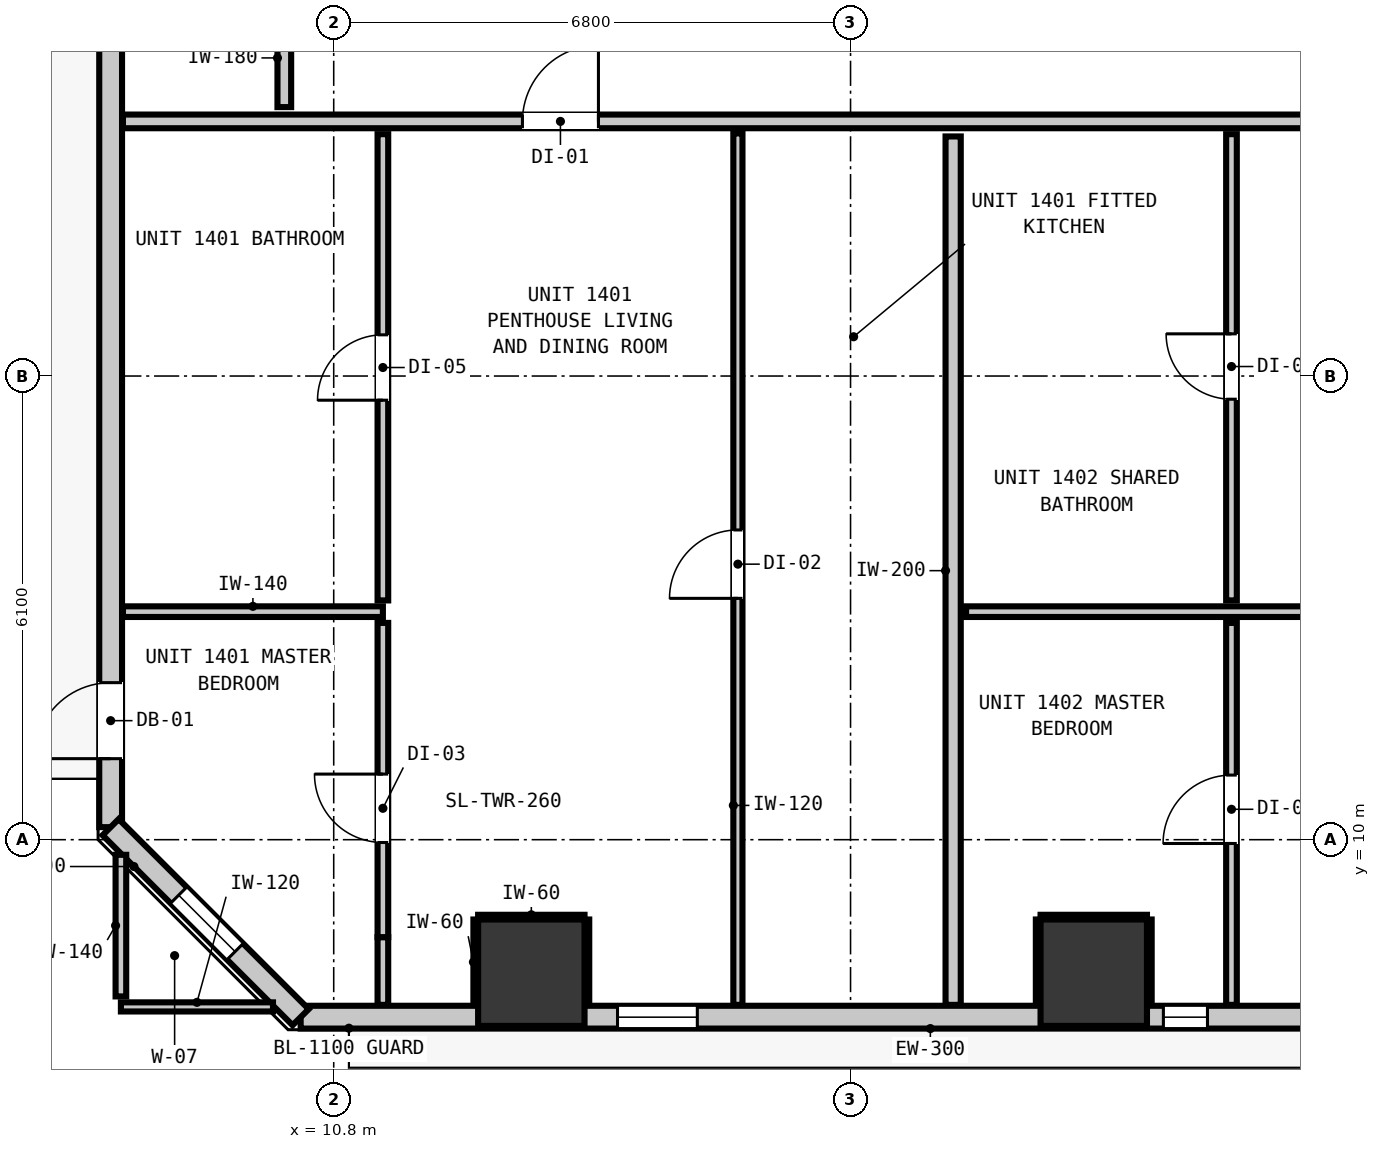
"""IFC4 building model, lengths in metres.
Left out: names, types, materials, properties, quantities, classifications, styles, units other than length and angle.
Written with IfcOpenShell. Run it as: python <this file> out.ifc"""

import sys

from ifc_helpers import new_model, si_unit, direction, frame, frame_2d, origin, origin_2d, place, context, subcontext, project, spatial, rectangle, extrude, element, fill, save


model = new_model("IFC4")
c1 = context("Model", 3, precision=1e-05, world=origin(), true_north=direction((0.0, 1.0)))
c2 = subcontext(c1, "Body", "Model", "MODEL_VIEW")
j1 = project(units=[si_unit("LENGTHUNIT", "METRE"), si_unit("PLANEANGLEUNIT", "RADIAN")], contexts=[c1])
p1 = place(None, origin())
s1 = spatial("IfcSite", under=j1, at=p1, CompositionType="ELEMENT")
p2 = place(p1, origin())
s2 = spatial("IfcBuilding", under=s1, at=p2, CompositionType="ELEMENT")
p3 = place(p2, frame((0.0, 0.0, 51.88)))
s3 = spatial("IfcBuildingStorey", under=s2, at=p3, CompositionType="ELEMENT", Elevation=51.88)
for number, where, z_axis, x_axis in (
    (1, (13.4, 8.25, 0.0), (0.0, 0.0, 1.0), (1.0, 0.0, 0.0)),
    (2, (20.8, 8.25, 0.0), (0.0, 0.0, 1.0), (1.0, 0.0, 0.0)),
):
    element("IfcColumn", number, at=place(p3, frame(where, z_axis=z_axis, x_axis=x_axis)), inside=s3, PredefinedType="COLUMN", context=c2, shape_type="SweptSolid", body=[
        extrude(rectangle(XDim=1.4, YDim=1.4, at=origin_2d()), origin(), (0.0, 0.0, 1.0), 3.32),
    ])
p4 = place(p3, frame((7.865, 10.165, 0.0), z_axis=(0.0, 0.0, 1.0), x_axis=(0.0, 1.0, 0.0)))
e3 = element("IfcWall", 3, at=p4, inside=s3, PredefinedType="STANDARD", context=c2, shape_type="SweptSolid", body=[
    extrude(rectangle(XDim=34.67, YDim=0.3, at=frame_2d((17.335, 0.0))), origin(), (0.0, 0.0, 1.0), 3.06),
])
p5 = place(p4, frame((0.901, 0.0, 0.0)))
e4 = element("IfcOpeningElement", 4, at=p5, cuts=e3, PredefinedType="OPENING", context=c2, shape_type="SweptSolid", body=[
    extrude(rectangle(XDim=1.0, YDim=2.15, at=frame_2d((0.5, 1.075))), frame((0.0, 0.16, 0.0), z_axis=(0.0, -1.0, 0.0), x_axis=(1.0, 0.0, 0.0)), (0.0, 0.0, 1.0), 0.32),
])
p6 = place(p3, frame((47.835, 7.665, 0.0), z_axis=(0.0, 0.0, 1.0), x_axis=(-1.0, 0.0, 0.0)))
e5 = element("IfcWall", 5, at=p6, inside=s3, PredefinedType="STANDARD", context=c2, shape_type="SweptSolid", body=[
    extrude(rectangle(XDim=37.47, YDim=0.3, at=frame_2d((18.735, 0.0))), origin(), (0.0, 0.0, 1.0), 3.06),
])
p7 = place(p6, frame((2.301, 0.0, 0.0)))
e6 = element("IfcOpeningElement", 6, at=p7, cuts=e5, PredefinedType="OPENING", context=c2, shape_type="SweptSolid", body=[
    extrude(rectangle(XDim=1.0, YDim=2.15, at=frame_2d((0.5, 1.075))), frame((0.0, 0.16, 0.0), z_axis=(0.0, -1.0, 0.0), x_axis=(1.0, 0.0, 0.0)), (0.0, 0.0, 1.0), 0.32),
])
p8 = place(p6, frame((32.251, 0.0, 0.85)))
e7 = element("IfcOpeningElement", 7, at=p8, cuts=e5, PredefinedType="OPENING", context=c2, shape_type="SweptSolid", body=[
    extrude(rectangle(XDim=1.05, YDim=1.65, at=frame_2d((0.525, 0.825))), frame((0.0, 0.16, 0.0), z_axis=(0.0, -1.0, 0.0), x_axis=(1.0, 0.0, 0.0)), (0.0, 0.0, 1.0), 0.32),
])
p9 = place(p6, frame((21.179, 0.0, 0.85)))
e8 = element("IfcOpeningElement", 8, at=p9, cuts=e5, PredefinedType="OPENING", context=c2, shape_type="SweptSolid", body=[
    extrude(rectangle(XDim=2.1, YDim=1.9, at=frame_2d((1.05, 0.95))), frame((0.0, 0.16, 0.0), z_axis=(0.0, -1.0, 0.0), x_axis=(1.0, 0.0, 0.0)), (0.0, 0.0, 1.0), 0.32),
])
p10 = place(p6, frame((25.539, 0.0, 0.85)))
e9 = element("IfcOpeningElement", 9, at=p10, cuts=e5, PredefinedType="OPENING", context=c2, shape_type="SweptSolid", body=[
    extrude(rectangle(XDim=0.58, YDim=1.5, at=frame_2d((0.29, 0.75))), frame((0.0, 0.16, 0.0), z_axis=(0.0, -1.0, 0.0), x_axis=(1.0, 0.0, 0.0)), (0.0, 0.0, 1.0), 0.32),
])
p11 = place(p6, frame((13.985, 0.0, 0.85)))
e10 = element("IfcOpeningElement", 10, at=p11, cuts=e5, PredefinedType="OPENING", context=c2, shape_type="SweptSolid", body=[
    extrude(rectangle(XDim=2.1, YDim=1.9, at=frame_2d((1.05, 0.95))), frame((0.0, 0.16, 0.0), z_axis=(0.0, -1.0, 0.0), x_axis=(1.0, 0.0, 0.0)), (0.0, 0.0, 1.0), 0.32),
])
p12 = place(p6, frame((5.412, 0.0, 0.85)))
e11 = element("IfcOpeningElement", 11, at=p12, cuts=e5, PredefinedType="OPENING", context=c2, shape_type="SweptSolid", body=[
    extrude(rectangle(XDim=2.1, YDim=1.9, at=frame_2d((1.05, 0.95))), frame((0.0, 0.16, 0.0), z_axis=(0.0, -1.0, 0.0), x_axis=(1.0, 0.0, 0.0)), (0.0, 0.0, 1.0), 0.32),
])
p13 = place(p6, frame((9.839, 0.0, 0.85)))
e12 = element("IfcOpeningElement", 12, at=p13, cuts=e5, PredefinedType="OPENING", context=c2, shape_type="SweptSolid", body=[
    extrude(rectangle(XDim=0.58, YDim=1.5, at=frame_2d((0.29, 0.75))), frame((0.0, 0.16, 0.0), z_axis=(0.0, -1.0, 0.0), x_axis=(1.0, 0.0, 0.0)), (0.0, 0.0, 1.0), 0.32),
])
p14 = place(p6, frame((0.364, 0.0, 0.85)))
e13 = element("IfcOpeningElement", 13, at=p14, cuts=e5, PredefinedType="OPENING", context=c2, shape_type="SweptSolid", body=[
    extrude(rectangle(XDim=1.05, YDim=1.65, at=frame_2d((0.525, 0.825))), frame((0.0, 0.16, 0.0), z_axis=(0.0, -1.0, 0.0), x_axis=(1.0, 0.0, 0.0)), (0.0, 0.0, 1.0), 0.32),
])
p15 = place(p3, frame((10.365, 7.665, 0.0), z_axis=(0.0, 0.0, 1.0), x_axis=(-0.707106781187, 0.707106781187, 0.0)))
e14 = element("IfcWall", 14, at=p15, inside=s3, PredefinedType="STANDARD", context=c2, shape_type="SweptSolid", body=[
    extrude(rectangle(XDim=3.536, YDim=0.3, at=frame_2d((1.768, 0.0))), origin(), (0.0, 0.0, 1.0), 3.06),
])
p16 = place(p15, frame((1.22, 0.0, 0.85)))
e15 = element("IfcOpeningElement", 15, at=p16, cuts=e14, PredefinedType="OPENING", context=c2, shape_type="SweptSolid", body=[
    extrude(rectangle(XDim=1.05, YDim=1.65, at=frame_2d((0.525, 0.825))), frame((0.0, 0.16, 0.0), z_axis=(0.0, -1.0, 0.0), x_axis=(1.0, 0.0, 0.0)), (0.0, 0.0, 1.0), 0.32),
])
p17 = place(p3, frame((8.027, 19.45, 0.0), z_axis=(0.0, 0.0, 1.0), x_axis=(1.0, 0.0, 0.0)))
e16 = element("IfcWall", 16, at=p17, inside=s3, PredefinedType="PARTITIONING", context=c2, shape_type="SweptSolid", body=[
    extrude(rectangle(XDim=42.146, YDim=0.18, at=frame_2d((21.073, 0.0))), origin(), (0.0, 0.0, 1.0), 3.06),
])
p18 = place(p17, frame((5.256, 0.0, 0.0)))
e17 = element("IfcOpeningElement", 17, at=p18, cuts=e16, PredefinedType="OPENING", context=c2, shape_type="SweptSolid", body=[
    extrude(rectangle(XDim=1.0, YDim=2.15, at=frame_2d((0.5, 1.075))), frame((0.0, 0.1, 0.0), z_axis=(0.0, -1.0, 0.0), x_axis=(1.0, 0.0, 0.0)), (0.0, 0.0, 1.0), 0.2),
])
p19 = place(p17, frame((18.169, 0.0, 0.0)))
e18 = element("IfcOpeningElement", 18, at=p19, cuts=e16, PredefinedType="OPENING", context=c2, shape_type="SweptSolid", body=[
    extrude(rectangle(XDim=1.0, YDim=2.15, at=frame_2d((0.5, 1.075))), frame((0.0, 0.1, 0.0), z_axis=(0.0, -1.0, 0.0), x_axis=(1.0, 0.0, 0.0)), (0.0, 0.0, 1.0), 0.2),
])
p20 = place(p17, frame((33.653, 0.0, 0.0)))
e19 = element("IfcOpeningElement", 19, at=p20, cuts=e16, PredefinedType="OPENING", context=c2, shape_type="SweptSolid", body=[
    extrude(rectangle(XDim=1.0, YDim=2.15, at=frame_2d((0.5, 1.075))), frame((0.0, 0.1, 0.0), z_axis=(0.0, -1.0, 0.0), x_axis=(1.0, 0.0, 0.0)), (0.0, 0.0, 1.0), 0.2),
])
p21 = place(p3, frame((8.027, 13.0, 0.0), z_axis=(0.0, 0.0, 1.0), x_axis=(1.0, 0.0, 0.0)))
e20 = element("IfcWall", 20, at=p21, inside=s3, PredefinedType="PARTITIONING", context=c2, shape_type="SweptSolid", body=[
    extrude(rectangle(XDim=3.42, YDim=0.14, at=frame_2d((1.71, 0.0))), origin(), (0.0, 0.0, 1.0), 3.06),
])
p22 = place(p3, frame((19.12, 13.0, 0.0), z_axis=(0.0, 0.0, 1.0), x_axis=(1.0, 0.0, 0.0)))
e21 = element("IfcWall", 21, at=p22, inside=s3, PredefinedType="PARTITIONING", context=c2, shape_type="SweptSolid", body=[
    extrude(rectangle(XDim=31.053, YDim=0.14, at=frame_2d((15.526, 0.0))), origin(), (0.0, 0.0, 1.0), 3.06),
])
p23 = place(p22, frame((7.126, 0.0, 0.0)))
e22 = element("IfcOpeningElement", 22, at=p23, cuts=e21, PredefinedType="OPENING", context=c2, shape_type="SweptSolid", body=[
    extrude(rectangle(XDim=0.9, YDim=2.1, at=frame_2d((0.45, 1.05))), frame((0.0, 0.08, 0.0), z_axis=(0.0, -1.0, 0.0), x_axis=(1.0, 0.0, 0.0)), (0.0, 0.0, 1.0), 0.16),
])
p24 = place(p22, frame((22.609, 0.0, 0.0)))
e23 = element("IfcOpeningElement", 23, at=p24, cuts=e21, PredefinedType="OPENING", context=c2, shape_type="SweptSolid", body=[
    extrude(rectangle(XDim=0.9, YDim=2.1, at=frame_2d((0.45, 1.05))), frame((0.0, 0.08, 0.0), z_axis=(0.0, -1.0, 0.0), x_axis=(1.0, 0.0, 0.0)), (0.0, 0.0, 1.0), 0.16),
])
p25 = place(p3, frame((8.0, 7.8, 0.0), z_axis=(0.0, 0.0, 1.0), x_axis=(1.0, 0.0, 0.0)))
e24 = element("IfcWall", 24, at=p25, inside=s3, PredefinedType="PARTITIONING", context=c2, shape_type="SweptSolid", body=[
    extrude(rectangle(XDim=2.001, YDim=0.12, at=frame_2d((1.0, 0.0))), origin(), (0.0, 0.0, 1.0), 3.06),
])
p26 = place(p3, frame((18.95, 7.827, 0.0), z_axis=(0.0, 0.0, 1.0), x_axis=(0.0, 1.0, 0.0)))
e25 = element("IfcWall", 25, at=p26, inside=s3, PredefinedType="PARTITIONING", context=c2, shape_type="SweptSolid", body=[
    extrude(rectangle(XDim=11.425, YDim=0.2, at=frame_2d((5.712, 0.0))), origin(), (0.0, 0.0, 1.0), 3.06),
])
p27 = place(p3, frame((10.15, 19.638, 0.0), z_axis=(0.0, 0.0, 1.0), x_axis=(0.0, 1.0, 0.0)))
e26 = element("IfcWall", 26, at=p27, inside=s3, PredefinedType="PARTITIONING", context=c2, shape_type="SweptSolid", body=[
    extrude(rectangle(XDim=1.294, YDim=0.18, at=frame_2d((0.647, 0.0))), origin(), (0.0, 0.0, 1.0), 3.06),
])
p28 = place(p3, frame((8.0, 7.938, 0.0), z_axis=(0.0, 0.0, 1.0), x_axis=(0.0, 1.0, 0.0)))
e27 = element("IfcWall", 27, at=p28, inside=s3, PredefinedType="PARTITIONING", context=c2, shape_type="SweptSolid", body=[
    extrude(rectangle(XDim=1.863, YDim=0.14, at=frame_2d((0.932, 0.0))), origin(), (0.0, 0.0, 1.0), 3.06),
])
p29 = place(p3, frame((11.447, 7.827, 0.0), z_axis=(0.0, 0.0, 1.0), x_axis=(0.0, 1.0, 0.0)))
e28 = element("IfcWall", 28, at=p29, inside=s3, PredefinedType="PARTITIONING", context=c2, shape_type="SweptSolid", body=[
    extrude(rectangle(XDim=0.891, YDim=0.14, at=frame_2d((0.446, 0.0))), origin(), (0.0, 0.0, 1.0), 3.06),
])
p30 = place(p3, frame((11.447, 8.718, 0.0), z_axis=(0.0, 0.0, 1.0), x_axis=(0.0, 1.0, 0.0)))
e29 = element("IfcWall", 29, at=p30, inside=s3, PredefinedType="PARTITIONING", context=c2, shape_type="SweptSolid", body=[
    extrude(rectangle(XDim=4.134, YDim=0.14, at=frame_2d((2.067, 0.0))), origin(), (0.0, 0.0, 1.0), 2.445),
])
p31 = place(p30, frame((1.245, 0.0, 0.0)))
e30 = element("IfcOpeningElement", 30, at=p31, cuts=e29, PredefinedType="OPENING", context=c2, shape_type="SweptSolid", body=[
    extrude(rectangle(XDim=0.9, YDim=2.1, at=frame_2d((0.45, 1.05))), frame((0.0, 0.08, 0.0), z_axis=(0.0, -1.0, 0.0), x_axis=(1.0, 0.0, 0.0)), (0.0, 0.0, 1.0), 0.16),
])
p32 = place(p3, frame((11.447, 13.148, 0.0), z_axis=(0.0, 0.0, 1.0), x_axis=(0.0, 1.0, 0.0)))
e31 = element("IfcWall", 31, at=p32, inside=s3, PredefinedType="PARTITIONING", context=c2, shape_type="SweptSolid", body=[
    extrude(rectangle(XDim=6.134, YDim=0.14, at=frame_2d((3.067, 0.0))), origin(), (0.0, 0.0, 1.0), 2.445),
])
p33 = place(p32, frame((2.634, 0.0, 0.0)))
e32 = element("IfcOpeningElement", 32, at=p33, cuts=e31, PredefinedType="OPENING", context=c2, shape_type="SweptSolid", body=[
    extrude(rectangle(XDim=0.86, YDim=2.02, at=frame_2d((0.43, 1.01))), frame((0.0, 0.08, 0.0), z_axis=(0.0, -1.0, 0.0), x_axis=(1.0, 0.0, 0.0)), (0.0, 0.0, 1.0), 0.16),
])
p34 = place(p3, frame((22.612, 7.827, 0.0), z_axis=(0.0, 0.0, 1.0), x_axis=(0.0, 1.0, 0.0)))
e33 = element("IfcWall", 33, at=p34, inside=s3, PredefinedType="PARTITIONING", context=c2, shape_type="SweptSolid", body=[
    extrude(rectangle(XDim=5.025, YDim=0.14, at=frame_2d((2.513, 0.0))), origin(), (0.0, 0.0, 1.0), 3.06),
])
p35 = place(p34, frame((2.123, 0.0, 0.0)))
e34 = element("IfcOpeningElement", 34, at=p35, cuts=e33, PredefinedType="OPENING", context=c2, shape_type="SweptSolid", body=[
    extrude(rectangle(XDim=0.9, YDim=2.1, at=frame_2d((0.45, 1.05))), frame((0.0, 0.08, 0.0), z_axis=(0.0, -1.0, 0.0), x_axis=(1.0, 0.0, 0.0)), (0.0, 0.0, 1.0), 0.16),
])
p36 = place(p3, frame((22.612, 13.148, 0.0), z_axis=(0.0, 0.0, 1.0), x_axis=(0.0, 1.0, 0.0)))
e35 = element("IfcWall", 35, at=p36, inside=s3, PredefinedType="PARTITIONING", context=c2, shape_type="SweptSolid", body=[
    extrude(rectangle(XDim=6.134, YDim=0.14, at=frame_2d((3.067, 0.0))), origin(), (0.0, 0.0, 1.0), 3.06),
])
p37 = place(p36, frame((2.647, 0.0, 0.0)))
e36 = element("IfcOpeningElement", 36, at=p37, cuts=e35, PredefinedType="OPENING", context=c2, shape_type="SweptSolid", body=[
    extrude(rectangle(XDim=0.86, YDim=2.02, at=frame_2d((0.43, 1.01))), frame((0.0, 0.08, 0.0), z_axis=(0.0, -1.0, 0.0), x_axis=(1.0, 0.0, 0.0)), (0.0, 0.0, 1.0), 0.16),
])
p38 = place(p3, frame((16.118, 7.827, 0.0), z_axis=(0.0, 0.0, 1.0), x_axis=(0.0, 1.0, 0.0)))
e37 = element("IfcWall", 37, at=p38, inside=s3, PredefinedType="PARTITIONING", context=c2, shape_type="SweptSolid", body=[
    extrude(rectangle(XDim=11.465, YDim=0.12, at=frame_2d((5.732, 0.0))), origin(), (0.0, 0.0, 1.0), 3.06),
])
p39 = place(p38, frame((5.348, 0.0, 0.0)))
e38 = element("IfcOpeningElement", 38, at=p39, cuts=e37, PredefinedType="OPENING", context=c2, shape_type="SweptSolid", body=[
    extrude(rectangle(XDim=0.9, YDim=2.1, at=frame_2d((0.45, 1.05))), frame((0.0, 0.07, 0.0), z_axis=(0.0, -1.0, 0.0), x_axis=(1.0, 0.0, 0.0)), (0.0, 0.0, 1.0), 0.14),
])
p40 = place(p3, frame((12.7, 8.982, 0.0), z_axis=(0.0, 0.0, 1.0), x_axis=(1.0, 0.0, 0.0)))
e39 = element("IfcWall", 39, at=p40, inside=s3, PredefinedType="PARTITIONING", context=c2, shape_type="SweptSolid", body=[
    extrude(rectangle(XDim=1.4, YDim=0.06, at=frame_2d((0.7, 0.0))), origin(), (0.0, 0.0, 1.0), 1.45),
])
for number, where, z_axis, x_axis in (
    (40, (12.668, 7.83, 0.0), (0.0, 0.0, 1.0), (0.0, 1.0, 0.0)),
    (41, (14.132, 7.83, 0.0), (0.0, 0.0, 1.0), (0.0, 1.0, 0.0)),
):
    element("IfcWall", number, at=place(p3, frame(where, z_axis=z_axis, x_axis=x_axis)), inside=s3, PredefinedType="PARTITIONING", context=c2, shape_type="SweptSolid", body=[
        extrude(rectangle(XDim=1.12, YDim=0.06, at=frame_2d((0.56, 0.0))), origin(), (0.0, 0.0, 1.0), 1.45),
    ])
p41 = place(p3, frame((20.1, 8.982, 0.0), z_axis=(0.0, 0.0, 1.0), x_axis=(1.0, 0.0, 0.0)))
e42 = element("IfcWall", 42, at=p41, inside=s3, PredefinedType="PARTITIONING", context=c2, shape_type="SweptSolid", body=[
    extrude(rectangle(XDim=1.4, YDim=0.06, at=frame_2d((0.7, 0.0))), origin(), (0.0, 0.0, 1.0), 1.45),
])
for number, where, z_axis, x_axis in (
    (43, (20.068, 7.83, 0.0), (0.0, 0.0, 1.0), (0.0, 1.0, 0.0)),
    (44, (21.532, 7.83, 0.0), (0.0, 0.0, 1.0), (0.0, 1.0, 0.0)),
):
    element("IfcWall", number, at=place(p3, frame(where, z_axis=z_axis, x_axis=x_axis)), inside=s3, PredefinedType="PARTITIONING", context=c2, shape_type="SweptSolid", body=[
        extrude(rectangle(XDim=1.12, YDim=0.06, at=frame_2d((0.56, 0.0))), origin(), (0.0, 0.0, 1.0), 1.45),
    ])
p42 = place(p5, origin())
e45 = element("IfcDoor", 45, at=p42, inside=s3, OperationType="SINGLE_SWING_LEFT", PredefinedType="DOOR", context=c2, shape_type="SweptSolid", body=[
    extrude(rectangle(XDim=1.0, YDim=2.15, at=frame_2d((0.5, 1.075))), frame((0.0, 0.025, 0.0), z_axis=(0.0, -1.0, 0.0), x_axis=(1.0, 0.0, 0.0)), (0.0, 0.0, 1.0), 0.05),
])
fill(e4, e45)
p43 = place(p8, origin())
e46 = element("IfcWindow", 46, at=p43, inside=s3, PartitioningType="SINGLE_PANEL", PredefinedType="WINDOW", context=c2, shape_type="SweptSolid", body=[
    extrude(rectangle(XDim=1.05, YDim=1.65, at=frame_2d((0.525, 0.825))), frame((0.0, 0.03, 0.0), z_axis=(0.0, -1.0, 0.0), x_axis=(1.0, 0.0, 0.0)), (0.0, 0.0, 1.0), 0.06),
])
fill(e7, e46)
p44 = place(p10, origin())
e47 = element("IfcWindow", 47, at=p44, inside=s3, PartitioningType="SINGLE_PANEL", PredefinedType="WINDOW", context=c2, shape_type="SweptSolid", body=[
    extrude(rectangle(XDim=0.58, YDim=1.5, at=frame_2d((0.29, 0.75))), frame((0.0, 0.03, 0.0), z_axis=(0.0, -1.0, 0.0), x_axis=(1.0, 0.0, 0.0)), (0.0, 0.0, 1.0), 0.06),
])
fill(e9, e47)
p45 = place(p16, origin())
e48 = element("IfcWindow", 48, at=p45, inside=s3, PartitioningType="SINGLE_PANEL", PredefinedType="WINDOW", context=c2, shape_type="SweptSolid", body=[
    extrude(rectangle(XDim=1.05, YDim=1.65, at=frame_2d((0.525, 0.825))), frame((0.0, 0.03, 0.0), z_axis=(0.0, -1.0, 0.0), x_axis=(1.0, 0.0, 0.0)), (0.0, 0.0, 1.0), 0.06),
])
fill(e15, e48)
p46 = place(p18, origin())
e49 = element("IfcDoor", 49, at=p46, inside=s3, OperationType="SINGLE_SWING_RIGHT", PredefinedType="DOOR", context=c2, shape_type="SweptSolid", body=[
    extrude(rectangle(XDim=1.0, YDim=2.15, at=frame_2d((0.5, 1.075))), frame((0.0, 0.025, 0.0), z_axis=(0.0, -1.0, 0.0), x_axis=(1.0, 0.0, 0.0)), (0.0, 0.0, 1.0), 0.05),
])
fill(e17, e49)
p47 = place(p33, origin())
e50 = element("IfcDoor", 50, at=p47, inside=s3, OperationType="SINGLE_SWING_LEFT", PredefinedType="DOOR", context=c2, shape_type="SweptSolid", body=[
    extrude(rectangle(XDim=0.86, YDim=2.02, at=frame_2d((0.43, 1.01))), frame((0.0, 0.025, 0.0), z_axis=(0.0, -1.0, 0.0), x_axis=(1.0, 0.0, 0.0)), (0.0, 0.0, 1.0), 0.05),
])
fill(e32, e50)
p48 = place(p31, origin())
e51 = element("IfcDoor", 51, at=p48, inside=s3, OperationType="SINGLE_SWING_RIGHT", PredefinedType="DOOR", context=c2, shape_type="SweptSolid", body=[
    extrude(rectangle(XDim=0.9, YDim=2.1, at=frame_2d((0.45, 1.05))), frame((0.0, 0.025, 0.0), z_axis=(0.0, -1.0, 0.0), x_axis=(1.0, 0.0, 0.0)), (0.0, 0.0, 1.0), 0.05),
])
fill(e30, e51)
p49 = place(p39, origin())
e52 = element("IfcDoor", 52, at=p49, inside=s3, OperationType="SINGLE_SWING_LEFT", PredefinedType="DOOR", context=c2, shape_type="SweptSolid", body=[
    extrude(rectangle(XDim=0.9, YDim=2.1, at=frame_2d((0.45, 1.05))), frame((0.0, 0.025, 0.0), z_axis=(0.0, -1.0, 0.0), x_axis=(1.0, 0.0, 0.0)), (0.0, 0.0, 1.0), 0.05),
])
fill(e38, e52)
p50 = place(p37, origin())
e53 = element("IfcDoor", 53, at=p50, inside=s3, OperationType="SINGLE_SWING_RIGHT", PredefinedType="DOOR", context=c2, shape_type="SweptSolid", body=[
    extrude(rectangle(XDim=0.86, YDim=2.02, at=frame_2d((0.43, 1.01))), frame((0.0, 0.025, 0.0), z_axis=(0.0, -1.0, 0.0), x_axis=(1.0, 0.0, 0.0)), (0.0, 0.0, 1.0), 0.05),
])
fill(e36, e53)
p51 = place(p35, origin())
e54 = element("IfcDoor", 54, at=p51, inside=s3, OperationType="SINGLE_SWING_LEFT", PredefinedType="DOOR", context=c2, shape_type="SweptSolid", body=[
    extrude(rectangle(XDim=0.9, YDim=2.1, at=frame_2d((0.45, 1.05))), frame((0.0, 0.025, 0.0), z_axis=(0.0, -1.0, 0.0), x_axis=(1.0, 0.0, 0.0)), (0.0, 0.0, 1.0), 0.05),
])
fill(e34, e54)
save(model, sys.argv[1])
